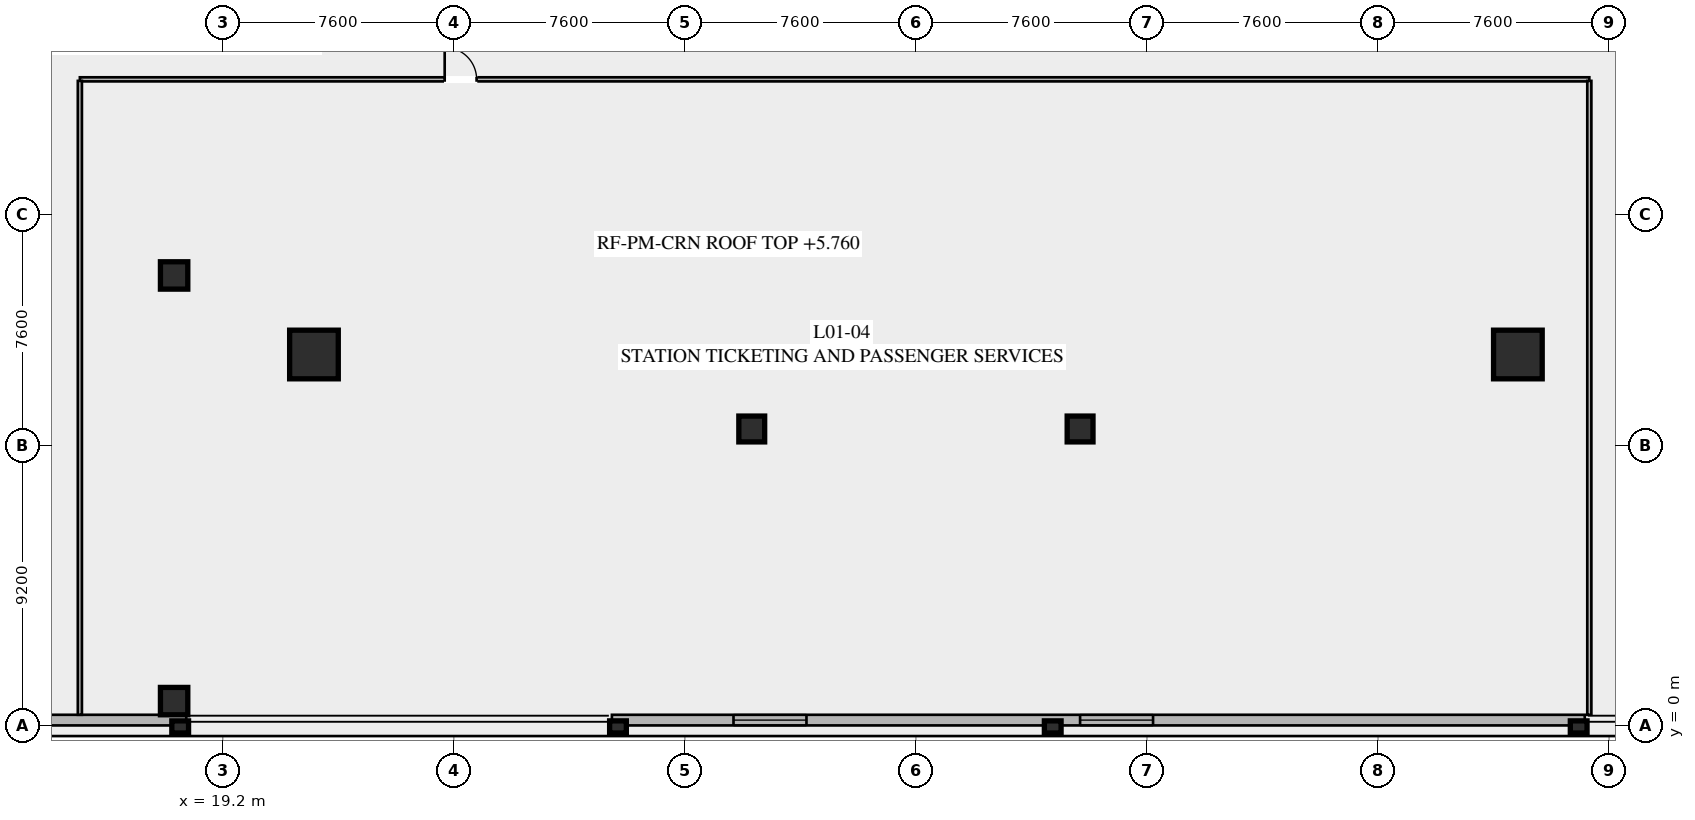
"""IFC4 building model, lengths in metres.
Left out: names, types, materials, properties, quantities, classifications, styles, units other than length and angle.
Written with IfcOpenShell. Run it as: python <this file> out.ifc"""

import sys

from ifc_helpers import new_model, si_unit, direction, frame, frame_2d, origin, origin_2d, place, context, subcontext, project, spatial, rectangle, hollow_rectangle, extrude, element, fill, save


model = new_model("IFC4")
c1 = context("Model", 3, precision=1e-05, world=origin(), true_north=direction((0.0, 1.0)))
c2 = subcontext(c1, "Body", "Model", "MODEL_VIEW")
j1 = project(units=[si_unit("LENGTHUNIT", "METRE"), si_unit("PLANEANGLEUNIT", "RADIAN")], contexts=[c1])
p1 = place(None, origin())
s1 = spatial("IfcSite", under=j1, at=p1, CompositionType="ELEMENT")
p2 = place(p1, origin())
s2 = spatial("IfcBuilding", under=s1, at=p2, CompositionType="ELEMENT")
p3 = place(p2, frame((0.0, 0.0, 5.4)))
s3 = spatial("IfcBuildingStorey", under=s2, at=p3, CompositionType="ELEMENT", Elevation=5.4)
for number, where, z_axis, x_axis in (
    (1, (22.2, 12.2, 0.0), (0.0, 0.0, 1.0), (1.0, 0.0, 0.0)),
    (2, (61.8, 12.2, 0.0), (0.0, 0.0, 1.0), (1.0, 0.0, 0.0)),
):
    element("IfcColumn", number, at=place(p3, frame(where, z_axis=z_axis, x_axis=x_axis)), inside=s3, PredefinedType="COLUMN", context=c2, shape_type="SweptSolid", body=[
        extrude(hollow_rectangle(XDim=1.6, YDim=1.6, WallThickness=0.06, at=origin_2d()), origin(), (0.0, 0.0, 1.0), 4.54),
    ])
for number, where, z_axis, x_axis in (
    (3, (36.6, 9.75, 0.0), (0.0, 0.0, 1.0), (1.0, 0.0, 0.0)),
    (4, (47.4, 9.75, 0.0), (0.0, 0.0, 1.0), (1.0, 0.0, 0.0)),
):
    element("IfcColumn", number, at=place(p3, frame(where, z_axis=z_axis, x_axis=x_axis)), inside=s3, PredefinedType="COLUMN", context=c2, shape_type="SweptSolid", body=[
        extrude(hollow_rectangle(XDim=0.85, YDim=0.85, WallThickness=0.035, at=origin_2d()), origin(), (0.0, 0.0, 1.0), 4.54),
    ])
for number, where, z_axis, x_axis in (
    (5, (17.6, 0.8, 0.0), (0.0, 0.0, 1.0), (1.0, 0.0, 0.0)),
    (6, (17.6, 14.8, 0.0), (0.0, 0.0, 1.0), (1.0, 0.0, 0.0)),
):
    element("IfcColumn", number, at=place(p3, frame(where, z_axis=z_axis, x_axis=x_axis)), inside=s3, PredefinedType="COLUMN", context=c2, shape_type="SweptSolid", body=[
        extrude(rectangle(XDim=0.9, YDim=0.9, at=origin_2d()), origin(), (0.0, 0.0, 1.0), 4.54),
    ])
p4 = place(p3, frame((64.0, 0.175, 0.0), z_axis=(0.0, 0.0, 1.0), x_axis=(-1.0, 0.0, 0.0)))
e7 = element("IfcWall", 7, at=p4, inside=s3, PredefinedType="SOLIDWALL", context=c2, shape_type="SweptSolid", body=[
    extrude(rectangle(XDim=32.0, YDim=0.35, at=frame_2d((16.0, 0.0))), origin(), (0.0, 0.0, 1.0), 4.54),
])
p5 = place(p4, frame((25.6, 0.0, 0.95)))
e8 = element("IfcOpeningElement", 8, at=p5, cuts=e7, PredefinedType="OPENING", context=c2, shape_type="SweptSolid", body=[
    extrude(rectangle(XDim=2.4, YDim=2.2, at=frame_2d((1.2, 1.1))), frame((0.0, 0.185, 0.0), z_axis=(0.0, -1.0, 0.0), x_axis=(1.0, 0.0, 0.0)), (0.0, 0.0, 1.0), 0.37),
])
p6 = place(p4, frame((14.2, 0.0, 0.95)))
e9 = element("IfcOpeningElement", 9, at=p6, cuts=e7, PredefinedType="OPENING", context=c2, shape_type="SweptSolid", body=[
    extrude(rectangle(XDim=2.4, YDim=2.2, at=frame_2d((1.2, 1.1))), frame((0.0, 0.185, 0.0), z_axis=(0.0, -1.0, 0.0), x_axis=(1.0, 0.0, 0.0)), (0.0, 0.0, 1.0), 0.37),
])
p7 = place(p3, frame((18.0, 0.175, 0.0), z_axis=(0.0, 0.0, 1.0), x_axis=(-1.0, 0.0, 0.0)))
e10 = element("IfcWall", 10, at=p7, inside=s3, PredefinedType="SOLIDWALL", context=c2, shape_type="SweptSolid", body=[
    extrude(rectangle(XDim=18.0, YDim=0.35, at=frame_2d((9.0, 0.0))), origin(), (0.0, 0.0, 1.0), 4.54),
])
p8 = place(p7, frame((11.4, 0.0, 0.95)))
e11 = element("IfcOpeningElement", 11, at=p8, cuts=e10, PredefinedType="OPENING", context=c2, shape_type="SweptSolid", body=[
    extrude(rectangle(XDim=2.4, YDim=2.2, at=frame_2d((1.2, 1.1))), frame((0.0, 0.185, 0.0), z_axis=(0.0, -1.0, 0.0), x_axis=(1.0, 0.0, 0.0)), (0.0, 0.0, 1.0), 0.37),
])
p9 = place(p7, frame((5.8, 0.0, 0.95)))
e12 = element("IfcOpeningElement", 12, at=p9, cuts=e10, PredefinedType="OPENING", context=c2, shape_type="SweptSolid", body=[
    extrude(rectangle(XDim=2.4, YDim=2.2, at=frame_2d((1.2, 1.1))), frame((0.0, 0.185, 0.0), z_axis=(0.0, -1.0, 0.0), x_axis=(1.0, 0.0, 0.0)), (0.0, 0.0, 1.0), 0.37),
])
for number, where, z_axis, x_axis in (
    (13, (17.8, -0.05, 0.0), (0.0, 0.0, 1.0), (1.0, 0.0, 0.0)),
    (14, (32.2, -0.05, 0.0), (0.0, 0.0, 1.0), (1.0, 0.0, 0.0)),
    (15, (46.5, -0.05, 0.0), (0.0, 0.0, 1.0), (1.0, 0.0, 0.0)),
    (16, (63.8, -0.05, 0.0), (0.0, 0.0, 1.0), (1.0, 0.0, 0.0)),
):
    element("IfcColumn", number, at=place(p3, frame(where, z_axis=z_axis, x_axis=x_axis)), inside=s3, PredefinedType="PILASTER", context=c2, shape_type="SweptSolid", body=[
        extrude(rectangle(XDim=0.55, YDim=0.4, at=origin_2d()), origin(), (0.0, 0.0, 1.0), 4.54),
    ])
p10 = place(p3, frame((14.5, 21.25, 0.0), z_axis=(0.0, 0.0, 1.0), x_axis=(1.0, 0.0, 0.0)))
e17 = element("IfcWall", 17, at=p10, inside=s3, PredefinedType="PARTITIONING", context=c2, shape_type="SweptSolid", body=[
    extrude(rectangle(XDim=49.65, YDim=0.135, at=frame_2d((24.825, 0.0))), origin(), (0.0, 0.0, 1.0), 3.583),
])
p11 = place(p10, frame((12.0, 0.0, 0.0)))
e18 = element("IfcOpeningElement", 18, at=p11, cuts=e17, PredefinedType="OPENING", context=c2, shape_type="SweptSolid", body=[
    extrude(rectangle(XDim=1.05, YDim=2.2, at=frame_2d((0.525, 1.1))), frame((0.0, 0.077, 0.0), z_axis=(0.0, -1.0, 0.0), x_axis=(1.0, 0.0, 0.0)), (0.0, 0.0, 1.0), 0.155),
])
for number, where, z_axis, x_axis in (
    (19, (14.5, 0.35, 0.0), (0.0, 0.0, 1.0), (0.0, 1.0, 0.0)),
    (20, (64.15, 0.35, 0.0), (0.0, 0.0, 1.0), (0.0, 1.0, 0.0)),
):
    element("IfcWall", number, at=place(p3, frame(where, z_axis=z_axis, x_axis=x_axis)), inside=s3, PredefinedType="PARTITIONING", context=c2, shape_type="SweptSolid", body=[
        extrude(rectangle(XDim=20.85, YDim=0.135, at=frame_2d((10.425, 0.0))), origin(), (0.0, 0.0, 1.0), 3.583),
    ])
p12 = place(p5, origin())
e21 = element("IfcWindow", 21, at=p12, inside=s3, PartitioningType="SINGLE_PANEL", PredefinedType="WINDOW", context=c2, shape_type="SweptSolid", body=[
    extrude(rectangle(XDim=2.4, YDim=2.2, at=frame_2d((1.2, 1.1))), frame((0.0, 0.03, 0.0), z_axis=(0.0, -1.0, 0.0), x_axis=(1.0, 0.0, 0.0)), (0.0, 0.0, 1.0), 0.06),
])
fill(e8, e21)
p13 = place(p6, origin())
e22 = element("IfcWindow", 22, at=p13, inside=s3, PartitioningType="SINGLE_PANEL", PredefinedType="WINDOW", context=c2, shape_type="SweptSolid", body=[
    extrude(rectangle(XDim=2.4, YDim=2.2, at=frame_2d((1.2, 1.1))), frame((0.0, 0.03, 0.0), z_axis=(0.0, -1.0, 0.0), x_axis=(1.0, 0.0, 0.0)), (0.0, 0.0, 1.0), 0.06),
])
fill(e9, e22)
p14 = place(p11, origin())
e23 = element("IfcDoor", 23, at=p14, inside=s3, OperationType="SINGLE_SWING_LEFT", PredefinedType="DOOR", context=c2, shape_type="SweptSolid", body=[
    extrude(rectangle(XDim=1.05, YDim=2.2, at=frame_2d((0.525, 1.1))), frame((0.0, 0.025, 0.0), z_axis=(0.0, -1.0, 0.0), x_axis=(1.0, 0.0, 0.0)), (0.0, 0.0, 1.0), 0.05),
])
fill(e18, e23)
save(model, sys.argv[1])
